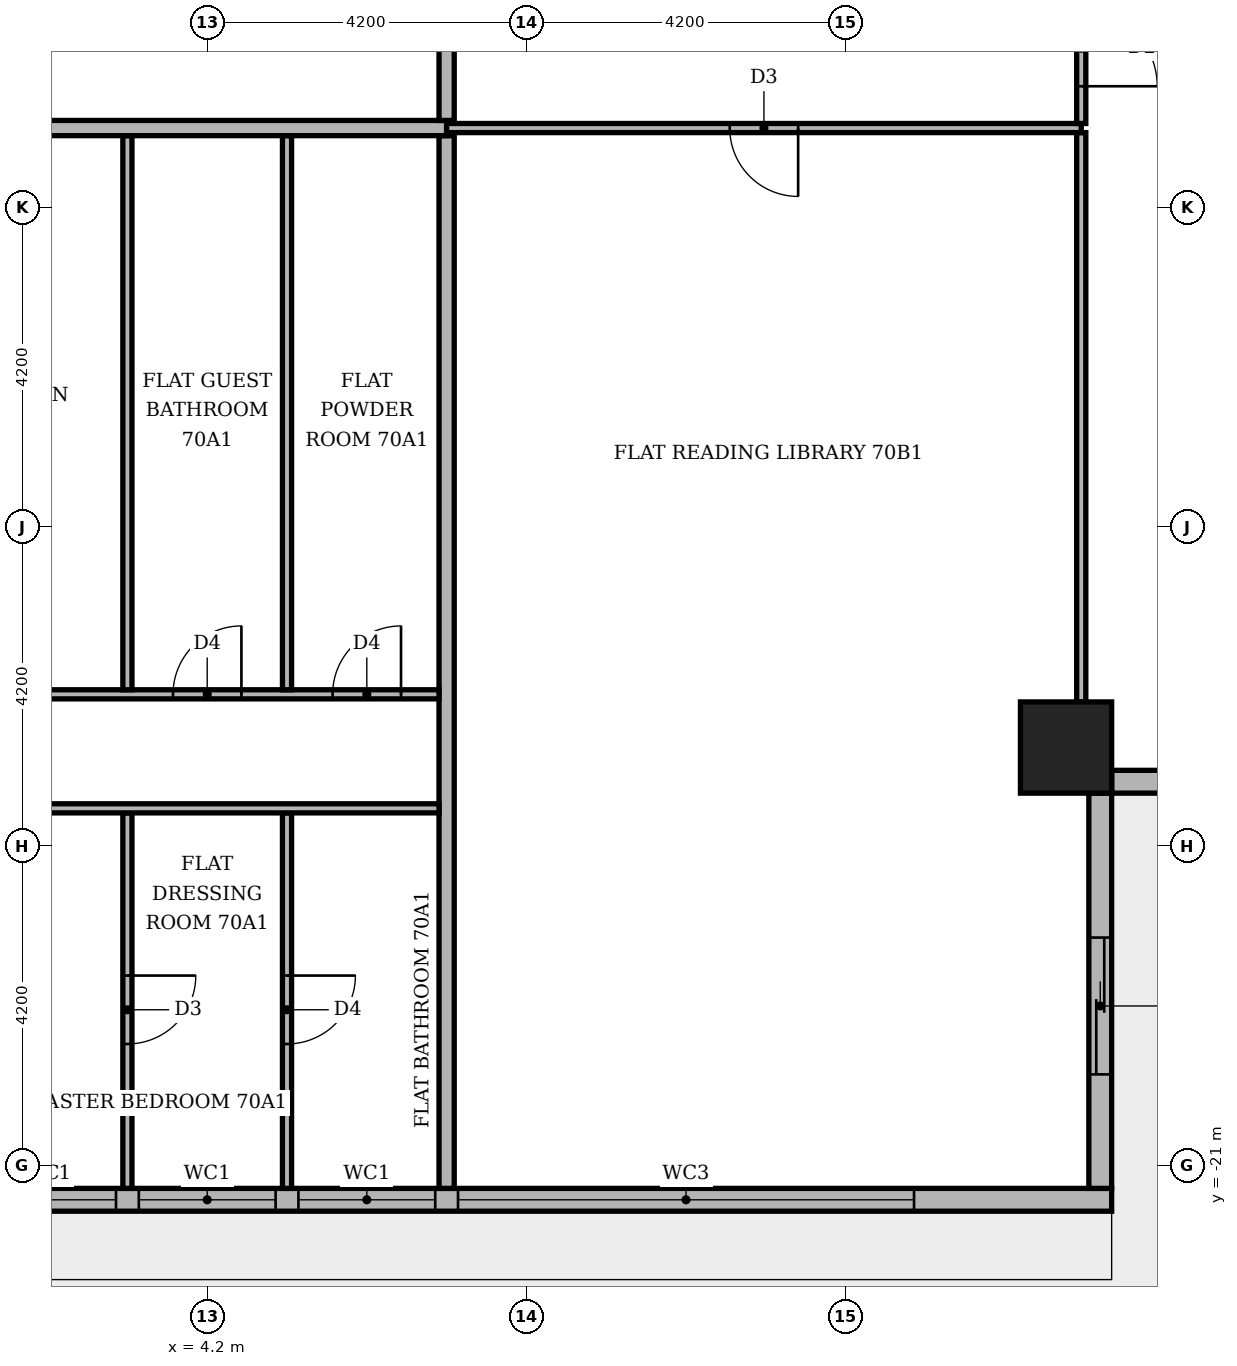
"""IFC4 building model, lengths in metres.
Left out: names, types, materials, properties, quantities, classifications, styles, units other than length and angle.
Written with IfcOpenShell. Run it as: python <this file> out.ifc"""

import sys

from ifc_helpers import new_model, si_unit, direction, frame, frame_2d, origin, origin_2d, place, context, subcontext, project, spatial, rectangle, extrude, element, fill, save


model = new_model("IFC4")
c1 = context("Model", 3, precision=1e-05, world=origin(), true_north=direction((0.0, 1.0)))
c2 = subcontext(c1, "Body", "Model", "MODEL_VIEW")
j1 = project(units=[si_unit("LENGTHUNIT", "METRE"), si_unit("PLANEANGLEUNIT", "RADIAN")], contexts=[c1])
p1 = place(None, origin())
s1 = spatial("IfcSite", under=j1, at=p1, CompositionType="ELEMENT")
p2 = place(p1, origin())
s2 = spatial("IfcBuilding", under=s1, at=p2, CompositionType="ELEMENT")
p3 = place(p2, frame((0.0, 0.0, 292.8)))
s3 = spatial("IfcBuildingStorey", under=s2, at=p3, CompositionType="ELEMENT", Elevation=292.8)
p4 = place(p3, frame((15.5, -15.5, -0.35), z_axis=(0.0, 0.0, 1.0), x_axis=(1.0, 0.0, 0.0)))
e1 = element("IfcColumn", 1, at=p4, inside=s3, PredefinedType="COLUMN", context=c2, shape_type="SweptSolid", body=[
    extrude(rectangle(XDim=1.2, YDim=1.2, at=origin_2d()), origin(), (0.0, 0.0, 1.0), 4.25),
])
p5 = place(p3, frame((-15.8, -21.45, 0.0), z_axis=(0.0, 0.0, 1.0), x_axis=(1.0, 0.0, 0.0)))
e2 = element("IfcWall", 2, at=p5, inside=s3, PredefinedType="STANDARD", context=c2, shape_type="SweptSolid", body=[
    extrude(rectangle(XDim=31.9, YDim=0.3, at=frame_2d((15.95, 0.0))), origin(), (0.0, 0.0, 1.0), 3.55),
])
p6 = place(p5, frame((0.2, 0.0, 0.6)))
e3 = element("IfcOpeningElement", 3, at=p6, cuts=e2, PredefinedType="OPENING", context=c2, shape_type="SweptSolid", body=[
    extrude(rectangle(XDim=3.9, YDim=2.4, at=frame_2d((1.95, 1.2))), frame((0.0, 0.16, 0.0), z_axis=(0.0, -1.0, 0.0), x_axis=(1.0, 0.0, 0.0)), (0.0, 0.0, 1.0), 0.32),
])
p7 = place(p5, frame((4.4, 0.0, 0.0)))
e4 = element("IfcOpeningElement", 4, at=p7, cuts=e2, PredefinedType="OPENING", context=c2, shape_type="SweptSolid", body=[
    extrude(rectangle(XDim=3.9, YDim=2.4, at=frame_2d((1.95, 1.2))), frame((0.0, 0.16, 0.0), z_axis=(0.0, -1.0, 0.0), x_axis=(1.0, 0.0, 0.0)), (0.0, 0.0, 1.0), 0.32),
])
p8 = place(p5, frame((8.6, 0.0, 0.6)))
e5 = element("IfcOpeningElement", 5, at=p8, cuts=e2, PredefinedType="OPENING", context=c2, shape_type="SweptSolid", body=[
    extrude(rectangle(XDim=1.8, YDim=2.4, at=frame_2d((0.9, 1.2))), frame((0.0, 0.16, 0.0), z_axis=(0.0, -1.0, 0.0), x_axis=(1.0, 0.0, 0.0)), (0.0, 0.0, 1.0), 0.32),
])
p9 = place(p5, frame((10.7, 0.0, 0.6)))
e6 = element("IfcOpeningElement", 6, at=p9, cuts=e2, PredefinedType="OPENING", context=c2, shape_type="SweptSolid", body=[
    extrude(rectangle(XDim=3.9, YDim=2.4, at=frame_2d((1.95, 1.2))), frame((0.0, 0.16, 0.0), z_axis=(0.0, -1.0, 0.0), x_axis=(1.0, 0.0, 0.0)), (0.0, 0.0, 1.0), 0.32),
])
p10 = place(p5, frame((14.9, 0.0, 0.0)))
e7 = element("IfcOpeningElement", 7, at=p10, cuts=e2, PredefinedType="OPENING", context=c2, shape_type="SweptSolid", body=[
    extrude(rectangle(XDim=1.8, YDim=2.4, at=frame_2d((0.9, 1.2))), frame((0.0, 0.16, 0.0), z_axis=(0.0, -1.0, 0.0), x_axis=(1.0, 0.0, 0.0)), (0.0, 0.0, 1.0), 0.32),
])
p11 = place(p5, frame((17.0, 0.0, 0.6)))
e8 = element("IfcOpeningElement", 8, at=p11, cuts=e2, PredefinedType="OPENING", context=c2, shape_type="SweptSolid", body=[
    extrude(rectangle(XDim=1.8, YDim=2.4, at=frame_2d((0.9, 1.2))), frame((0.0, 0.16, 0.0), z_axis=(0.0, -1.0, 0.0), x_axis=(1.0, 0.0, 0.0)), (0.0, 0.0, 1.0), 0.32),
])
p12 = place(p5, frame((19.1, 0.0, 0.6)))
e9 = element("IfcOpeningElement", 9, at=p12, cuts=e2, PredefinedType="OPENING", context=c2, shape_type="SweptSolid", body=[
    extrude(rectangle(XDim=1.8, YDim=2.4, at=frame_2d((0.9, 1.2))), frame((0.0, 0.16, 0.0), z_axis=(0.0, -1.0, 0.0), x_axis=(1.0, 0.0, 0.0)), (0.0, 0.0, 1.0), 0.32),
])
p13 = place(p5, frame((21.2, 0.0, 0.6)))
e10 = element("IfcOpeningElement", 10, at=p13, cuts=e2, PredefinedType="OPENING", context=c2, shape_type="SweptSolid", body=[
    extrude(rectangle(XDim=1.8, YDim=2.4, at=frame_2d((0.9, 1.2))), frame((0.0, 0.16, 0.0), z_axis=(0.0, -1.0, 0.0), x_axis=(1.0, 0.0, 0.0)), (0.0, 0.0, 1.0), 0.32),
])
p14 = place(p5, frame((23.3, 0.0, 0.6)))
e11 = element("IfcOpeningElement", 11, at=p14, cuts=e2, PredefinedType="OPENING", context=c2, shape_type="SweptSolid", body=[
    extrude(rectangle(XDim=6.0, YDim=2.4, at=frame_2d((3.0, 1.2))), frame((0.0, 0.16, 0.0), z_axis=(0.0, -1.0, 0.0), x_axis=(1.0, 0.0, 0.0)), (0.0, 0.0, 1.0), 0.32),
])
p15 = place(p3, frame((15.95, -21.3, 0.0), z_axis=(0.0, 0.0, 1.0), x_axis=(0.0, 1.0, 0.0)))
e12 = element("IfcWall", 12, at=p15, inside=s3, PredefinedType="STANDARD", context=c2, shape_type="SweptSolid", body=[
    extrude(rectangle(XDim=5.2, YDim=0.3, at=frame_2d((2.6, 0.0))), origin(), (0.0, 0.0, 1.0), 3.55),
])
p16 = place(p15, frame((1.5, 0.0, 0.0)))
e13 = element("IfcOpeningElement", 13, at=p16, cuts=e12, PredefinedType="OPENING", context=c2, shape_type="SweptSolid", body=[
    extrude(rectangle(XDim=1.8, YDim=2.4, at=frame_2d((0.9, 1.2))), frame((0.0, 0.16, 0.0), z_axis=(0.0, -1.0, 0.0), x_axis=(1.0, 0.0, 0.0)), (0.0, 0.0, 1.0), 0.32),
])
p17 = place(p3, frame((16.1, -15.95, 0.0), z_axis=(0.0, 0.0, 1.0), x_axis=(1.0, 0.0, 0.0)))
e14 = element("IfcWall", 14, at=p17, inside=s3, PredefinedType="STANDARD", context=c2, shape_type="SweptSolid", body=[
    extrude(rectangle(XDim=5.5, YDim=0.3, at=frame_2d((2.75, 0.0))), origin(), (0.0, 0.0, 1.0), 3.55),
])
p18 = place(p17, frame((1.9, 0.0, 0.0)))
e15 = element("IfcOpeningElement", 15, at=p18, cuts=e14, PredefinedType="OPENING", context=c2, shape_type="SweptSolid", body=[
    extrude(rectangle(XDim=1.8, YDim=2.4, at=frame_2d((0.9, 1.2))), frame((0.0, 0.16, 0.0), z_axis=(0.0, -1.0, 0.0), x_axis=(1.0, 0.0, 0.0)), (0.0, 0.0, 1.0), 0.32),
])
p19 = place(p3, frame((3.15, -21.3, 0.0), z_axis=(0.0, 0.0, 1.0), x_axis=(0.0, 1.0, 0.0)))
e16 = element("IfcWall", 16, at=p19, inside=s3, PredefinedType="PARTITIONING", context=c2, shape_type="SweptSolid", body=[
    extrude(rectangle(XDim=4.94, YDim=0.12, at=frame_2d((2.47, 0.0))), origin(), (0.0, 0.0, 1.0), 3.55),
])
p20 = place(p19, frame((1.9, 0.0, 0.0)))
e17 = element("IfcOpeningElement", 17, at=p20, cuts=e16, PredefinedType="OPENING", context=c2, shape_type="SweptSolid", body=[
    extrude(rectangle(XDim=0.9, YDim=2.1, at=frame_2d((0.45, 1.05))), frame((0.0, 0.07, 0.0), z_axis=(0.0, -1.0, 0.0), x_axis=(1.0, 0.0, 0.0)), (0.0, 0.0, 1.0), 0.14),
])
p21 = place(p3, frame((5.25, -21.3, 0.0), z_axis=(0.0, 0.0, 1.0), x_axis=(0.0, 1.0, 0.0)))
e18 = element("IfcWall", 18, at=p21, inside=s3, PredefinedType="PARTITIONING", context=c2, shape_type="SweptSolid", body=[
    extrude(rectangle(XDim=4.94, YDim=0.12, at=frame_2d((2.47, 0.0))), origin(), (0.0, 0.0, 1.0), 3.55),
])
p22 = place(p21, frame((1.9, 0.0, 0.0)))
e19 = element("IfcOpeningElement", 19, at=p22, cuts=e18, PredefinedType="OPENING", context=c2, shape_type="SweptSolid", body=[
    extrude(rectangle(XDim=0.9, YDim=2.1, at=frame_2d((0.45, 1.05))), frame((0.0, 0.07, 0.0), z_axis=(0.0, -1.0, 0.0), x_axis=(1.0, 0.0, 0.0)), (0.0, 0.0, 1.0), 0.14),
])
p23 = place(p3, frame((7.35, -21.3, 0.0), z_axis=(0.0, 0.0, 1.0), x_axis=(0.0, 1.0, 0.0)))
e20 = element("IfcWall", 20, at=p23, inside=s3, PredefinedType="PARTITIONING", context=c2, shape_type="SweptSolid", body=[
    extrude(rectangle(XDim=13.85, YDim=0.2, at=frame_2d((6.925, 0.0))), origin(), (0.0, 0.0, 1.0), 3.55),
])
p24 = place(p3, frame((-15.8, -16.3, 0.0), z_axis=(0.0, 0.0, 1.0), x_axis=(1.0, 0.0, 0.0)))
e21 = element("IfcWall", 21, at=p24, inside=s3, PredefinedType="PARTITIONING", context=c2, shape_type="SweptSolid", body=[
    extrude(rectangle(XDim=23.05, YDim=0.12, at=frame_2d((11.525, 0.0))), origin(), (0.0, 0.0, 1.0), 3.55),
])
p25 = place(p24, frame((9.0, 0.0, 0.0)))
e22 = element("IfcOpeningElement", 22, at=p25, cuts=e21, PredefinedType="OPENING", context=c2, shape_type="SweptSolid", body=[
    extrude(rectangle(XDim=1.0, YDim=2.1, at=frame_2d((0.5, 1.05))), frame((0.0, 0.07, 0.0), z_axis=(0.0, -1.0, 0.0), x_axis=(1.0, 0.0, 0.0)), (0.0, 0.0, 1.0), 0.14),
])
p26 = place(p24, frame((12.15, 0.0, 0.0)))
e23 = element("IfcOpeningElement", 23, at=p26, cuts=e21, PredefinedType="OPENING", context=c2, shape_type="SweptSolid", body=[
    extrude(rectangle(XDim=1.0, YDim=2.1, at=frame_2d((0.5, 1.05))), frame((0.0, 0.07, 0.0), z_axis=(0.0, -1.0, 0.0), x_axis=(1.0, 0.0, 0.0)), (0.0, 0.0, 1.0), 0.14),
])
p27 = place(p24, frame((16.4, 0.0, 0.0)))
e24 = element("IfcOpeningElement", 24, at=p27, cuts=e21, PredefinedType="OPENING", context=c2, shape_type="SweptSolid", body=[
    extrude(rectangle(XDim=0.9, YDim=2.1, at=frame_2d((0.45, 1.05))), frame((0.0, 0.07, 0.0), z_axis=(0.0, -1.0, 0.0), x_axis=(1.0, 0.0, 0.0)), (0.0, 0.0, 1.0), 0.14),
])
p28 = place(p3, frame((15.7, -14.9, 0.0), z_axis=(0.0, 0.0, 1.0), x_axis=(0.0, 1.0, 0.0)))
e25 = element("IfcWall", 25, at=p28, inside=s3, PredefinedType="PARTITIONING", context=c2, shape_type="SweptSolid", body=[
    extrude(rectangle(XDim=7.49, YDim=0.12, at=frame_2d((3.745, 0.0))), origin(), (0.0, 0.0, 1.0), 3.55),
])
p29 = place(p3, frame((-1.05, -14.8, 0.0), z_axis=(0.0, 0.0, 1.0), x_axis=(1.0, 0.0, 0.0)))
e26 = element("IfcWall", 26, at=p29, inside=s3, PredefinedType="PARTITIONING", context=c2, shape_type="SweptSolid", body=[
    extrude(rectangle(XDim=8.3, YDim=0.12, at=frame_2d((4.15, 0.0))), origin(), (0.0, 0.0, 1.0), 3.55),
])
p30 = place(p29, frame((4.8, 0.0, 0.0)))
e27 = element("IfcOpeningElement", 27, at=p30, cuts=e26, PredefinedType="OPENING", context=c2, shape_type="SweptSolid", body=[
    extrude(rectangle(XDim=0.9, YDim=2.1, at=frame_2d((0.45, 1.05))), frame((0.0, 0.07, 0.0), z_axis=(0.0, -1.0, 0.0), x_axis=(1.0, 0.0, 0.0)), (0.0, 0.0, 1.0), 0.14),
])
p31 = place(p29, frame((6.9, 0.0, 0.0)))
e28 = element("IfcOpeningElement", 28, at=p31, cuts=e26, PredefinedType="OPENING", context=c2, shape_type="SweptSolid", body=[
    extrude(rectangle(XDim=0.9, YDim=2.1, at=frame_2d((0.45, 1.05))), frame((0.0, 0.07, 0.0), z_axis=(0.0, -1.0, 0.0), x_axis=(1.0, 0.0, 0.0)), (0.0, 0.0, 1.0), 0.14),
])
for number, where, z_axis, x_axis in (
    (29, (3.15, -14.74, 0.0), (0.0, 0.0, 1.0), (0.0, 1.0, 0.0)),
    (30, (5.25, -14.74, 0.0), (0.0, 0.0, 1.0), (0.0, 1.0, 0.0)),
):
    element("IfcWall", number, at=place(p3, frame(where, z_axis=z_axis, x_axis=x_axis)), inside=s3, PredefinedType="PARTITIONING", context=c2, shape_type="SweptSolid", body=[
        extrude(rectangle(XDim=7.29, YDim=0.12, at=frame_2d((3.645, 0.0))), origin(), (0.0, 0.0, 1.0), 3.55),
    ])
p32 = place(p3, frame((-21.3, -7.35, 0.0), z_axis=(0.0, 0.0, 1.0), x_axis=(1.0, 0.0, 0.0)))
e31 = element("IfcWall", 31, at=p32, inside=s3, PredefinedType="PARTITIONING", context=c2, shape_type="SweptSolid", body=[
    extrude(rectangle(XDim=28.65, YDim=0.2, at=frame_2d((14.325, 0.0))), origin(), (0.0, 0.0, 1.0), 3.55),
])
p33 = place(p32, frame((16.55, 0.0, 0.0)))
e32 = element("IfcOpeningElement", 32, at=p33, cuts=e31, PredefinedType="OPENING", context=c2, shape_type="SweptSolid", body=[
    extrude(rectangle(XDim=1.1, YDim=2.4, at=frame_2d((0.55, 1.2))), frame((0.0, 0.11, 0.0), z_axis=(0.0, -1.0, 0.0), x_axis=(1.0, 0.0, 0.0)), (0.0, 0.0, 1.0), 0.22),
])
p34 = place(p3, frame((7.35, -7.35, 0.0), z_axis=(0.0, 0.0, 1.0), x_axis=(1.0, 0.0, 0.0)))
e33 = element("IfcWall", 33, at=p34, inside=s3, PredefinedType="PARTITIONING", context=c2, shape_type="SweptSolid", body=[
    extrude(rectangle(XDim=8.35, YDim=0.12, at=frame_2d((4.175, 0.0))), origin(), (0.0, 0.0, 1.0), 3.55),
])
p35 = place(p34, frame((3.725, 0.0, 0.0)))
e34 = element("IfcOpeningElement", 34, at=p35, cuts=e33, PredefinedType="OPENING", context=c2, shape_type="SweptSolid", body=[
    extrude(rectangle(XDim=0.9, YDim=2.1, at=frame_2d((0.45, 1.05))), frame((0.0, 0.07, 0.0), z_axis=(0.0, -1.0, 0.0), x_axis=(1.0, 0.0, 0.0)), (0.0, 0.0, 1.0), 0.14),
])
p36 = place(p3, frame((15.7, -7.29, 0.0), z_axis=(0.0, 0.0, 1.0), x_axis=(0.0, 1.0, 0.0)))
e35 = element("IfcWall", 35, at=p36, inside=s3, PredefinedType="PARTITIONING", context=c2, shape_type="SweptSolid", body=[
    extrude(rectangle(XDim=1.98, YDim=0.12, at=frame_2d((0.99, 0.0))), origin(), (0.0, 0.0, 1.0), 3.55),
])
p37 = place(p36, frame((0.49, 0.0, 0.0)))
e36 = element("IfcOpeningElement", 36, at=p37, cuts=e35, PredefinedType="OPENING", context=c2, shape_type="SweptSolid", body=[
    extrude(rectangle(XDim=1.0, YDim=2.1, at=frame_2d((0.5, 1.05))), frame((0.0, 0.07, 0.0), z_axis=(0.0, -1.0, 0.0), x_axis=(1.0, 0.0, 0.0)), (0.0, 0.0, 1.0), 0.14),
])
p38 = place(p3, frame((7.35, -7.25, 0.0), z_axis=(0.0, 0.0, 1.0), x_axis=(0.0, 1.0, 0.0)))
e37 = element("IfcWall", 37, at=p38, inside=s3, PredefinedType="PARTITIONING", context=c2, shape_type="SweptSolid", body=[
    extrude(rectangle(XDim=14.5, YDim=0.2, at=frame_2d((7.25, 0.0))), origin(), (0.0, 0.0, 1.0), 3.55),
])
p39 = place(p38, frame((2.5, 0.0, 0.0)))
e38 = element("IfcOpeningElement", 38, at=p39, cuts=e37, PredefinedType="OPENING", context=c2, shape_type="SweptSolid", body=[
    extrude(rectangle(XDim=1.1, YDim=2.4, at=frame_2d((0.55, 1.2))), frame((0.0, 0.11, 0.0), z_axis=(0.0, -1.0, 0.0), x_axis=(1.0, 0.0, 0.0)), (0.0, 0.0, 1.0), 0.22),
])
p40 = place(p11, origin())
e39 = element("IfcWindow", 39, at=p40, inside=s3, PartitioningType="SINGLE_PANEL", PredefinedType="WINDOW", context=c2, shape_type="SweptSolid", body=[
    extrude(rectangle(XDim=1.8, YDim=2.4, at=frame_2d((0.9, 1.2))), frame((0.0, 0.03, 0.0), z_axis=(0.0, -1.0, 0.0), x_axis=(1.0, 0.0, 0.0)), (0.0, 0.0, 1.0), 0.06),
])
fill(e8, e39)
p41 = place(p12, origin())
e40 = element("IfcWindow", 40, at=p41, inside=s3, PartitioningType="SINGLE_PANEL", PredefinedType="WINDOW", context=c2, shape_type="SweptSolid", body=[
    extrude(rectangle(XDim=1.8, YDim=2.4, at=frame_2d((0.9, 1.2))), frame((0.0, 0.03, 0.0), z_axis=(0.0, -1.0, 0.0), x_axis=(1.0, 0.0, 0.0)), (0.0, 0.0, 1.0), 0.06),
])
fill(e9, e40)
p42 = place(p13, origin())
e41 = element("IfcWindow", 41, at=p42, inside=s3, PartitioningType="SINGLE_PANEL", PredefinedType="WINDOW", context=c2, shape_type="SweptSolid", body=[
    extrude(rectangle(XDim=1.8, YDim=2.4, at=frame_2d((0.9, 1.2))), frame((0.0, 0.03, 0.0), z_axis=(0.0, -1.0, 0.0), x_axis=(1.0, 0.0, 0.0)), (0.0, 0.0, 1.0), 0.06),
])
fill(e10, e41)
p43 = place(p14, origin())
e42 = element("IfcWindow", 42, at=p43, inside=s3, PartitioningType="SINGLE_PANEL", PredefinedType="WINDOW", context=c2, shape_type="SweptSolid", body=[
    extrude(rectangle(XDim=6.0, YDim=2.4, at=frame_2d((3.0, 1.2))), frame((0.0, 0.03, 0.0), z_axis=(0.0, -1.0, 0.0), x_axis=(1.0, 0.0, 0.0)), (0.0, 0.0, 1.0), 0.06),
])
fill(e11, e42)
p44 = place(p16, origin())
e43 = element("IfcDoor", 43, at=p44, inside=s3, OperationType="SLIDING_TO_RIGHT", PredefinedType="DOOR", context=c2, shape_type="SweptSolid", body=[
    extrude(rectangle(XDim=1.8, YDim=2.4, at=frame_2d((0.9, 1.2))), frame((0.0, 0.025, 0.0), z_axis=(0.0, -1.0, 0.0), x_axis=(1.0, 0.0, 0.0)), (0.0, 0.0, 1.0), 0.05),
])
fill(e13, e43)
p45 = place(p30, origin())
e44 = element("IfcDoor", 44, at=p45, inside=s3, OperationType="SINGLE_SWING_RIGHT", PredefinedType="DOOR", context=c2, shape_type="SweptSolid", body=[
    extrude(rectangle(XDim=0.9, YDim=2.1, at=frame_2d((0.45, 1.05))), frame((0.0, 0.025, 0.0), z_axis=(0.0, -1.0, 0.0), x_axis=(1.0, 0.0, 0.0)), (0.0, 0.0, 1.0), 0.05),
])
fill(e27, e44)
p46 = place(p31, origin())
e45 = element("IfcDoor", 45, at=p46, inside=s3, OperationType="SINGLE_SWING_RIGHT", PredefinedType="DOOR", context=c2, shape_type="SweptSolid", body=[
    extrude(rectangle(XDim=0.9, YDim=2.1, at=frame_2d((0.45, 1.05))), frame((0.0, 0.025, 0.0), z_axis=(0.0, -1.0, 0.0), x_axis=(1.0, 0.0, 0.0)), (0.0, 0.0, 1.0), 0.05),
])
fill(e28, e45)
p47 = place(p20, frame((0.9, 0.0, 0.0), z_axis=(0.0, 0.0, 1.0), x_axis=(-1.0, 0.0, 0.0)))
e46 = element("IfcDoor", 46, at=p47, inside=s3, OperationType="SINGLE_SWING_RIGHT", PredefinedType="DOOR", context=c2, shape_type="SweptSolid", body=[
    extrude(rectangle(XDim=0.9, YDim=2.1, at=frame_2d((0.45, 1.05))), frame((0.0, 0.025, 0.0), z_axis=(0.0, -1.0, 0.0), x_axis=(1.0, 0.0, 0.0)), (0.0, 0.0, 1.0), 0.05),
])
fill(e17, e46)
p48 = place(p22, frame((0.9, 0.0, 0.0), z_axis=(0.0, 0.0, 1.0), x_axis=(-1.0, 0.0, 0.0)))
e47 = element("IfcDoor", 47, at=p48, inside=s3, OperationType="SINGLE_SWING_RIGHT", PredefinedType="DOOR", context=c2, shape_type="SweptSolid", body=[
    extrude(rectangle(XDim=0.9, YDim=2.1, at=frame_2d((0.45, 1.05))), frame((0.0, 0.025, 0.0), z_axis=(0.0, -1.0, 0.0), x_axis=(1.0, 0.0, 0.0)), (0.0, 0.0, 1.0), 0.05),
])
fill(e19, e47)
p49 = place(p35, frame((0.9, 0.0, 0.0), z_axis=(0.0, 0.0, 1.0), x_axis=(-1.0, 0.0, 0.0)))
e48 = element("IfcDoor", 48, at=p49, inside=s3, OperationType="SINGLE_SWING_RIGHT", PredefinedType="DOOR", context=c2, shape_type="SweptSolid", body=[
    extrude(rectangle(XDim=0.9, YDim=2.1, at=frame_2d((0.45, 1.05))), frame((0.0, 0.025, 0.0), z_axis=(0.0, -1.0, 0.0), x_axis=(1.0, 0.0, 0.0)), (0.0, 0.0, 1.0), 0.05),
])
fill(e34, e48)
p50 = place(p37, frame((1.0, 0.0, 0.0), z_axis=(0.0, 0.0, 1.0), x_axis=(-1.0, 0.0, 0.0)))
e49 = element("IfcDoor", 49, at=p50, inside=s3, OperationType="SINGLE_SWING_LEFT", PredefinedType="DOOR", context=c2, shape_type="SweptSolid", body=[
    extrude(rectangle(XDim=1.0, YDim=2.1, at=frame_2d((0.5, 1.05))), frame((0.0, 0.025, 0.0), z_axis=(0.0, -1.0, 0.0), x_axis=(1.0, 0.0, 0.0)), (0.0, 0.0, 1.0), 0.05),
])
fill(e36, e49)
save(model, sys.argv[1])
